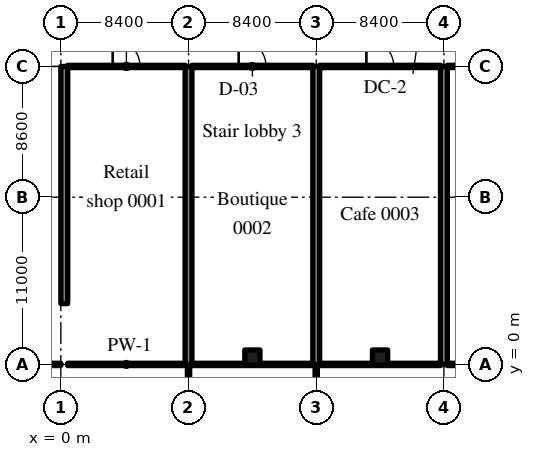
"""IFC4 building model, lengths in metres.
Left out: names, types, materials, properties, quantities, classifications, styles, units other than length and angle.
Written with IfcOpenShell. Run it as: python <this file> out.ifc"""

import sys

from ifc_helpers import new_model, si_unit, direction, frame, frame_2d, origin, origin_2d, place, context, subcontext, project, spatial, rectangle, extrude, source, transform, mapped, element, fill, save


model = new_model("IFC4")
c1 = context("Model", 3, precision=1e-05, world=origin(), true_north=direction((0.0, 1.0)))
c2 = subcontext(c1, "Body", "Model", "MODEL_VIEW")
j1 = project(units=[si_unit("LENGTHUNIT", "METRE"), si_unit("PLANEANGLEUNIT", "RADIAN")], contexts=[c1])
p1 = place(None, origin())
s1 = spatial("IfcSite", under=j1, at=p1, CompositionType="ELEMENT")
p2 = place(p1, origin())
s2 = spatial("IfcBuilding", under=s1, at=p2, CompositionType="ELEMENT")
p3 = place(p2, origin())
s3 = spatial("IfcBuildingStorey", under=s2, at=p3, CompositionType="ELEMENT", Elevation=0.0)
m1 = source(origin(), c2, "Body", "SweptSolid", [
    extrude(rectangle(XDim=15.6, YDim=0.45, at=frame_2d((7.8, 0.0))), origin(), (0.0, 0.0, 1.0), 5.72),
])
p4 = place(p3, frame((0.225, 4.0, 0.0), z_axis=(0.0, 0.0, 1.0), x_axis=(0.0, 1.0, 0.0)))
e1 = element("IfcWall", 1, at=p4, inside=s3, PredefinedType="SHEAR", context=c2, shape_type="MappedRepresentation", body=[
    mapped(m1, transform((0.0, 0.0, 0.0), scale=1.0)),
])
m2 = source(origin(), c2, "Body", "SweptSolid", [
    extrude(rectangle(XDim=19.6, YDim=0.45, at=frame_2d((9.8, 0.0))), origin(), (0.0, 0.0, 1.0), 5.72),
])
for number, where, z_axis, x_axis in (
    (2, (8.4, 0.0, 0.0), (0.0, 0.0, 1.0), (0.0, 1.0, 0.0)),
    (3, (16.8, 0.0, 0.0), (0.0, 0.0, 1.0), (0.0, 1.0, 0.0)),
    (4, (25.2, 0.0, 0.0), (0.0, 0.0, 1.0), (0.0, 1.0, 0.0)),
):
    element("IfcWall", number, at=place(p3, frame(where, z_axis=z_axis, x_axis=x_axis)), inside=s3, PredefinedType="SHEAR", context=c2, shape_type="MappedRepresentation", body=[
        mapped(m2, transform((0.0, 0.0, 0.0), scale=1.0)),
    ])
m3 = source(origin(), c2, "Body", "SweptSolid", [
    extrude(rectangle(XDim=1.0, YDim=1.0, at=origin_2d()), origin(), (0.0, 0.0, 1.0), 5.72),
])
for number, where, z_axis, x_axis in (
    (5, (12.6, 0.45, 0.0), (0.0, 0.0, 1.0), (1.0, 0.0, 0.0)),
    (6, (21.0, 0.45, 0.0), (0.0, 0.0, 1.0), (1.0, 0.0, 0.0)),
):
    element("IfcColumn", number, at=place(p3, frame(where, z_axis=z_axis, x_axis=x_axis)), inside=s3, PredefinedType="COLUMN", context=c2, shape_type="MappedRepresentation", body=[
        mapped(m3, transform((0.0, 0.0, 0.0), scale=1.0)),
    ])
m4 = source(origin(), c2, "Body", "SweptSolid", [
    extrude(rectangle(XDim=7.725, YDim=0.15, at=frame_2d((3.863, 0.0))), origin(), (0.0, 0.0, 1.0), 5.02),
])
p5 = place(p3, frame((0.45, 19.6, 0.0), z_axis=(0.0, 0.0, 1.0), x_axis=(1.0, 0.0, 0.0)))
e7 = element("IfcWall", 7, at=p5, inside=s3, PredefinedType="PARTITIONING", context=c2, shape_type="MappedRepresentation", body=[
    mapped(m4, transform((0.0, 0.0, 0.0), scale=1.0)),
])
m5 = source(origin(), c2, "Body", "SweptSolid", [
    extrude(rectangle(XDim=1.8, YDim=2.1, at=frame_2d((0.9, 1.05))), frame((0.0, 0.085, 0.0), z_axis=(0.0, -1.0, 0.0), x_axis=(1.0, 0.0, 0.0)), (0.0, 0.0, 1.0), 0.17),
])
p6 = place(p5, frame((2.962, 0.0, 0.0)))
e8 = element("IfcOpeningElement", 8, at=p6, cuts=e7, PredefinedType="OPENING", context=c2, shape_type="MappedRepresentation", body=[
    mapped(m5, transform((0.0, 0.0, 0.0), scale=1.0)),
])
m6 = source(origin(), c2, "Body", "SweptSolid", [
    extrude(rectangle(XDim=7.725, YDim=0.15, at=frame_2d((3.863, 0.0))), origin(), (0.0, 0.0, 1.0), 5.72),
])
p7 = place(p3, frame((0.45, 0.0, 0.0), z_axis=(0.0, 0.0, 1.0), x_axis=(1.0, 0.0, 0.0)))
e9 = element("IfcWall", 9, at=p7, inside=s3, PredefinedType="PARTITIONING", context=c2, shape_type="MappedRepresentation", body=[
    mapped(m6, transform((0.0, 0.0, 0.0), scale=1.0)),
])
m7 = source(origin(), c2, "Body", "SweptSolid", [
    extrude(rectangle(XDim=7.95, YDim=0.15, at=frame_2d((3.975, 0.0))), origin(), (0.0, 0.0, 1.0), 5.02),
])
p8 = place(p3, frame((8.625, 19.6, 0.0), z_axis=(0.0, 0.0, 1.0), x_axis=(1.0, 0.0, 0.0)))
e10 = element("IfcWall", 10, at=p8, inside=s3, PredefinedType="PARTITIONING", context=c2, shape_type="MappedRepresentation", body=[
    mapped(m7, transform((0.0, 0.0, 0.0), scale=1.0)),
])
p9 = place(p8, frame((3.075, 0.0, 0.0)))
e11 = element("IfcOpeningElement", 11, at=p9, cuts=e10, PredefinedType="OPENING", context=c2, shape_type="MappedRepresentation", body=[
    mapped(m5, transform((0.0, 0.0, 0.0), scale=1.0)),
])
m8 = source(origin(), c2, "Body", "SweptSolid", [
    extrude(rectangle(XDim=7.95, YDim=0.15, at=frame_2d((3.975, 0.0))), origin(), (0.0, 0.0, 1.0), 5.72),
])
p10 = place(p3, frame((8.625, 0.0, 0.0), z_axis=(0.0, 0.0, 1.0), x_axis=(1.0, 0.0, 0.0)))
e12 = element("IfcWall", 12, at=p10, inside=s3, PredefinedType="PARTITIONING", context=c2, shape_type="MappedRepresentation", body=[
    mapped(m8, transform((0.0, 0.0, 0.0), scale=1.0)),
])
m9 = source(origin(), c2, "Body", "SweptSolid", [
    extrude(rectangle(XDim=7.95, YDim=0.15, at=frame_2d((3.975, 0.0))), origin(), (0.0, 0.0, 1.0), 5.02),
])
p11 = place(p3, frame((17.025, 19.6, 0.0), z_axis=(0.0, 0.0, 1.0), x_axis=(1.0, 0.0, 0.0)))
e13 = element("IfcWall", 13, at=p11, inside=s3, PredefinedType="PARTITIONING", context=c2, shape_type="MappedRepresentation", body=[
    mapped(m9, transform((0.0, 0.0, 0.0), scale=1.0)),
])
p12 = place(p11, frame((3.075, 0.0, 0.0)))
e14 = element("IfcOpeningElement", 14, at=p12, cuts=e13, PredefinedType="OPENING", context=c2, shape_type="MappedRepresentation", body=[
    mapped(m5, transform((0.0, 0.0, 0.0), scale=1.0)),
])
m10 = source(origin(), c2, "Body", "SweptSolid", [
    extrude(rectangle(XDim=7.95, YDim=0.15, at=frame_2d((3.975, 0.0))), origin(), (0.0, 0.0, 1.0), 5.72),
])
p13 = place(p3, frame((17.025, 0.0, 0.0), z_axis=(0.0, 0.0, 1.0), x_axis=(1.0, 0.0, 0.0)))
e15 = element("IfcWall", 15, at=p13, inside=s3, PredefinedType="PARTITIONING", context=c2, shape_type="MappedRepresentation", body=[
    mapped(m10, transform((0.0, 0.0, 0.0), scale=1.0)),
])
p14 = place(p3, frame((25.425, 19.6, 0.0), z_axis=(0.0, 0.0, 1.0), x_axis=(1.0, 0.0, 0.0)))
e16 = element("IfcWall", 16, at=p14, inside=s3, PredefinedType="PARTITIONING", context=c2, shape_type="MappedRepresentation", body=[
    mapped(m7, transform((0.0, 0.0, 0.0), scale=1.0)),
])
p15 = place(p14, frame((3.075, 0.0, 0.0)))
e17 = element("IfcOpeningElement", 17, at=p15, cuts=e16, PredefinedType="OPENING", context=c2, shape_type="MappedRepresentation", body=[
    mapped(m5, transform((0.0, 0.0, 0.0), scale=1.0)),
])
p16 = place(p3, frame((25.425, 0.0, 0.0), z_axis=(0.0, 0.0, 1.0), x_axis=(1.0, 0.0, 0.0)))
e18 = element("IfcWall", 18, at=p16, inside=s3, PredefinedType="PARTITIONING", context=c2, shape_type="MappedRepresentation", body=[
    mapped(m8, transform((0.0, 0.0, 0.0), scale=1.0)),
])
m11 = source(origin(), c2, "Body", "SweptSolid", [
    extrude(rectangle(XDim=11.425, YDim=0.15, at=frame_2d((5.712, 0.0))), origin(), (0.0, 0.0, 1.0), 4.12),
])
p17 = place(p3, frame((8.4, -11.5, 0.0), z_axis=(0.0, 0.0, 1.0), x_axis=(0.0, 1.0, 0.0)))
e19 = element("IfcWall", 19, at=p17, inside=s3, PredefinedType="PARTITIONING", context=c2, shape_type="MappedRepresentation", body=[
    mapped(m11, transform((0.0, 0.0, 0.0), scale=1.0)),
])
p18 = place(p17, frame((5.6, 0.0, 0.0)))
e20 = element("IfcOpeningElement", 20, at=p18, cuts=e19, PredefinedType="OPENING", context=c2, shape_type="MappedRepresentation", body=[
    mapped(m5, transform((0.0, 0.0, 0.0), scale=1.0)),
])
p19 = place(p3, frame((16.8, -11.5, 0.0), z_axis=(0.0, 0.0, 1.0), x_axis=(0.0, 1.0, 0.0)))
e21 = element("IfcWall", 21, at=p19, inside=s3, PredefinedType="PARTITIONING", context=c2, shape_type="MappedRepresentation", body=[
    mapped(m11, transform((0.0, 0.0, 0.0), scale=1.0)),
])
p20 = place(p19, frame((0.85, 0.0, 0.0)))
e22 = element("IfcOpeningElement", 22, at=p20, cuts=e21, PredefinedType="OPENING", context=c2, shape_type="MappedRepresentation", body=[
    mapped(m5, transform((0.0, 0.0, 0.0), scale=1.0)),
])
m12 = source(origin(), c2, "Body", "SweptSolid", [
    extrude(rectangle(XDim=6.4, YDim=0.15, at=frame_2d((3.2, 0.0))), origin(), (0.0, 0.0, 1.0), 5.72),
])
p21 = place(p3, frame((-6.4, 0.0, 0.0), z_axis=(0.0, 0.0, 1.0), x_axis=(1.0, 0.0, 0.0)))
e23 = element("IfcWall", 23, at=p21, inside=s3, PredefinedType="PARTITIONING", context=c2, shape_type="MappedRepresentation", body=[
    mapped(m12, transform((0.0, 0.0, 0.0), scale=1.0)),
])
m13 = source(origin(), c2, "Body", "SweptSolid", [
    extrude(rectangle(XDim=1.8, YDim=2.1, at=frame_2d((0.9, 1.05))), frame((0.0, 0.025, 0.0), z_axis=(0.0, -1.0, 0.0), x_axis=(1.0, 0.0, 0.0)), (0.0, 0.0, 1.0), 0.05),
])
p22 = place(p6, origin())
e24 = element("IfcDoor", 24, at=p22, inside=s3, OperationType="DOUBLE_DOOR_SINGLE_SWING", PredefinedType="DOOR", context=c2, shape_type="MappedRepresentation", body=[
    mapped(m13, transform((0.0, 0.0, 0.0), scale=1.0)),
])
fill(e8, e24)
p23 = place(p9, origin())
e25 = element("IfcDoor", 25, at=p23, inside=s3, OperationType="DOUBLE_DOOR_SINGLE_SWING", PredefinedType="DOOR", context=c2, shape_type="MappedRepresentation", body=[
    mapped(m13, transform((0.0, 0.0, 0.0), scale=1.0)),
])
fill(e11, e25)
p24 = place(p12, origin())
e26 = element("IfcDoor", 26, at=p24, inside=s3, OperationType="DOUBLE_DOOR_SINGLE_SWING", PredefinedType="DOOR", context=c2, shape_type="MappedRepresentation", body=[
    mapped(m13, transform((0.0, 0.0, 0.0), scale=1.0)),
])
fill(e14, e26)
save(model, sys.argv[1])
